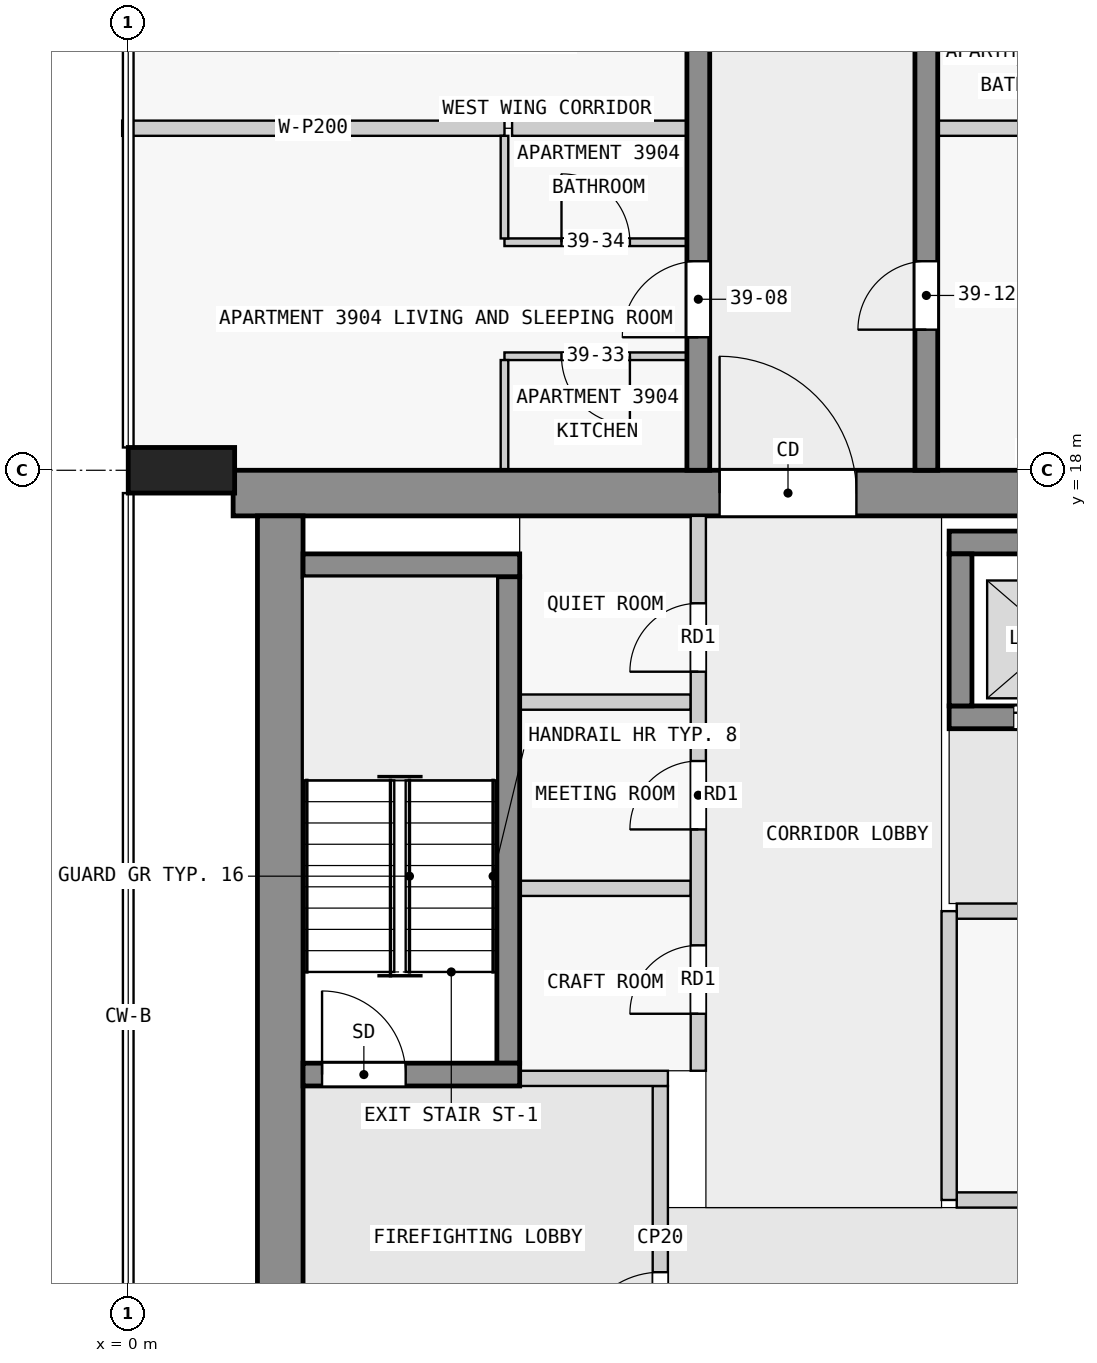
"""IFC4 building model, lengths in metres.
Left out: names, types, materials, properties, quantities, classifications, styles, units other than length and angle.
Written with IfcOpenShell. Run it as: python <this file> out.ifc"""

import sys

from ifc_helpers import new_model, si_unit, direction, frame, frame_2d, origin, origin_2d, place, context, subcontext, project, spatial, rectangle, extrude, element, fill, save


model = new_model("IFC4")
c1 = context("Model", 3, precision=1e-05, world=origin(), true_north=direction((0.0, 1.0)))
c2 = subcontext(c1, "Body", "Model", "MODEL_VIEW")
j1 = project(units=[si_unit("LENGTHUNIT", "METRE"), si_unit("PLANEANGLEUNIT", "RADIAN")], contexts=[c1])
p1 = place(None, origin())
s1 = spatial("IfcSite", under=j1, at=p1, CompositionType="ELEMENT")
p2 = place(p1, origin())
s2 = spatial("IfcBuilding", under=s1, at=p2, CompositionType="ELEMENT")
p3 = place(p2, frame((0.0, 0.0, 153.4)))
s3 = spatial("IfcBuildingStorey", under=s2, at=p3, CompositionType="ELEMENT", Elevation=153.4)
p4 = place(p3, frame((0.7, 18.0, 0.0), z_axis=(0.0, 0.0, 1.0), x_axis=(0.0, 1.0, 0.0)))
e1 = element("IfcColumn", 1, at=p4, inside=s3, PredefinedType="COLUMN", context=c2, shape_type="SweptSolid", body=[
    extrude(rectangle(XDim=0.6, YDim=1.4, at=origin_2d()), origin(), (0.0, 0.0, 1.0), 3.5),
])
p5 = place(p3, frame((1.38, 17.7, 0.0), z_axis=(0.0, 0.0, 1.0), x_axis=(1.0, 0.0, 0.0)))
e2 = element("IfcWall", 2, at=p5, inside=s3, PredefinedType="SHEAR", context=c2, shape_type="SweptSolid", body=[
    extrude(rectangle(XDim=21.12, YDim=0.6, at=frame_2d((10.56, 0.0))), origin(), (0.0, 0.0, 1.0), 3.25),
])
p6 = place(p5, frame((6.4, 0.0, 0.0)))
e3 = element("IfcOpeningElement", 3, at=p6, cuts=e2, PredefinedType="OPENING", context=c2, shape_type="SweptSolid", body=[
    extrude(rectangle(XDim=1.8, YDim=2.1, at=frame_2d((0.9, 1.05))), frame((0.0, 0.31, 0.0), z_axis=(0.0, -1.0, 0.0), x_axis=(1.0, 0.0, 0.0)), (0.0, 0.0, 1.0), 0.62),
])
p7 = place(p3, frame((2.0, 2.5, 0.0), z_axis=(0.0, 0.0, 1.0), x_axis=(0.0, 1.0, 0.0)))
e4 = element("IfcWall", 4, at=p7, inside=s3, PredefinedType="SHEAR", context=c2, shape_type="SweptSolid", body=[
    extrude(rectangle(XDim=14.9, YDim=0.6, at=frame_2d((7.45, 0.0))), origin(), (0.0, 0.0, 1.0), 3.25),
])
p8 = place(p3, frame((2.3, 10.05, 0.0), z_axis=(0.0, 0.0, 1.0), x_axis=(1.0, 0.0, 0.0)))
e5 = element("IfcWall", 5, at=p8, inside=s3, PredefinedType="SHEAR", context=c2, shape_type="SweptSolid", body=[
    extrude(rectangle(XDim=2.85, YDim=0.3, at=frame_2d((1.425, 0.0))), origin(), (0.0, 0.0, 1.0), 3.25),
])
p9 = place(p8, frame((0.25, 0.0, 0.0)))
e6 = element("IfcOpeningElement", 6, at=p9, cuts=e5, PredefinedType="OPENING", context=c2, shape_type="SweptSolid", body=[
    extrude(rectangle(XDim=1.1, YDim=2.1, at=frame_2d((0.55, 1.05))), frame((0.0, 0.16, 0.0), z_axis=(0.0, -1.0, 0.0), x_axis=(1.0, 0.0, 0.0)), (0.0, 0.0, 1.0), 0.32),
])
p10 = place(p3, frame((5.0, 10.2, 0.0), z_axis=(0.0, 0.0, 1.0), x_axis=(0.0, 1.0, 0.0)))
e7 = element("IfcWall", 7, at=p10, inside=s3, PredefinedType="SHEAR", context=c2, shape_type="SweptSolid", body=[
    extrude(rectangle(XDim=6.4, YDim=0.3, at=frame_2d((3.2, 0.0))), origin(), (0.0, 0.0, 1.0), 3.25),
])
p11 = place(p3, frame((2.3, 16.75, 0.0), z_axis=(0.0, 0.0, 1.0), x_axis=(1.0, 0.0, 0.0)))
e8 = element("IfcWall", 8, at=p11, inside=s3, PredefinedType="SHEAR", context=c2, shape_type="SweptSolid", body=[
    extrude(rectangle(XDim=2.85, YDim=0.3, at=frame_2d((1.425, 0.0))), origin(), (0.0, 0.0, 1.0), 3.25),
])
p12 = place(p3, frame((10.8, 17.05, 0.0), z_axis=(0.0, 0.0, 1.0), x_axis=(1.0, 0.0, 0.0)))
e9 = element("IfcWall", 9, at=p12, inside=s3, PredefinedType="SHEAR", context=c2, shape_type="SweptSolid", body=[
    extrude(rectangle(XDim=7.8, YDim=0.3, at=frame_2d((3.9, 0.0))), origin(), (0.0, 0.0, 1.0), 3.25),
])
p13 = place(p3, frame((10.8, 14.75, 0.0), z_axis=(0.0, 0.0, 1.0), x_axis=(1.0, 0.0, 0.0)))
e10 = element("IfcWall", 10, at=p13, inside=s3, PredefinedType="SHEAR", context=c2, shape_type="SweptSolid", body=[
    extrude(rectangle(XDim=7.8, YDim=0.3, at=frame_2d((3.9, 0.0))), origin(), (0.0, 0.0, 1.0), 3.25),
])
p14 = place(p13, frame((0.85, 0.0, 0.0)))
e11 = element("IfcOpeningElement", 11, at=p14, cuts=e10, PredefinedType="OPENING", context=c2, shape_type="SweptSolid", body=[
    extrude(rectangle(XDim=1.1, YDim=2.1, at=frame_2d((0.55, 1.05))), frame((0.0, 0.16, 0.0), z_axis=(0.0, -1.0, 0.0), x_axis=(1.0, 0.0, 0.0)), (0.0, 0.0, 1.0), 0.32),
])
p15 = place(p13, frame((3.35, 0.0, 0.0)))
e12 = element("IfcOpeningElement", 12, at=p15, cuts=e10, PredefinedType="OPENING", context=c2, shape_type="SweptSolid", body=[
    extrude(rectangle(XDim=1.1, YDim=2.1, at=frame_2d((0.55, 1.05))), frame((0.0, 0.16, 0.0), z_axis=(0.0, -1.0, 0.0), x_axis=(1.0, 0.0, 0.0)), (0.0, 0.0, 1.0), 0.32),
])
p16 = place(p13, frame((5.85, 0.0, 0.0)))
e13 = element("IfcOpeningElement", 13, at=p16, cuts=e10, PredefinedType="OPENING", context=c2, shape_type="SweptSolid", body=[
    extrude(rectangle(XDim=1.1, YDim=2.1, at=frame_2d((0.55, 1.05))), frame((0.0, 0.16, 0.0), z_axis=(0.0, -1.0, 0.0), x_axis=(1.0, 0.0, 0.0)), (0.0, 0.0, 1.0), 0.32),
])
p17 = place(p3, frame((10.95, 14.9, 0.0), z_axis=(0.0, 0.0, 1.0), x_axis=(0.0, 1.0, 0.0)))
e14 = element("IfcWall", 14, at=p17, inside=s3, PredefinedType="SHEAR", context=c2, shape_type="SweptSolid", body=[
    extrude(rectangle(XDim=2.0, YDim=0.3, at=frame_2d((1.0, 0.0))), origin(), (0.0, 0.0, 1.0), 3.25),
])
p18 = place(p3, frame((7.5, 18.0, 0.0), z_axis=(0.0, 0.0, 1.0), x_axis=(0.0, 1.0, 0.0)))
e15 = element("IfcWall", 15, at=p18, inside=s3, PredefinedType="SHEAR", context=c2, shape_type="SweptSolid", body=[
    extrude(rectangle(XDim=27.0, YDim=0.3, at=frame_2d((13.5, 0.0))), origin(), (0.0, 0.0, 1.0), 3.25),
])
p19 = place(p18, frame((1.75, 0.0, 0.0)))
e16 = element("IfcOpeningElement", 16, at=p19, cuts=e15, PredefinedType="OPENING", context=c2, shape_type="SweptSolid", body=[
    extrude(rectangle(XDim=1.0, YDim=2.1, at=frame_2d((0.5, 1.05))), frame((0.0, 0.16, 0.0), z_axis=(0.0, -1.0, 0.0), x_axis=(1.0, 0.0, 0.0)), (0.0, 0.0, 1.0), 0.32),
])
p20 = place(p18, frame((5.85, 0.0, 0.0)))
e17 = element("IfcOpeningElement", 17, at=p20, cuts=e15, PredefinedType="OPENING", context=c2, shape_type="SweptSolid", body=[
    extrude(rectangle(XDim=1.8, YDim=2.1, at=frame_2d((0.9, 1.05))), frame((0.0, 0.16, 0.0), z_axis=(0.0, -1.0, 0.0), x_axis=(1.0, 0.0, 0.0)), (0.0, 0.0, 1.0), 0.32),
])
p21 = place(p18, frame((13.05, 0.0, 0.0)))
e18 = element("IfcOpeningElement", 18, at=p21, cuts=e15, PredefinedType="OPENING", context=c2, shape_type="SweptSolid", body=[
    extrude(rectangle(XDim=1.0, YDim=2.1, at=frame_2d((0.5, 1.05))), frame((0.0, 0.16, 0.0), z_axis=(0.0, -1.0, 0.0), x_axis=(1.0, 0.0, 0.0)), (0.0, 0.0, 1.0), 0.32),
])
p22 = place(p18, frame((21.35, 0.0, 0.0)))
e19 = element("IfcOpeningElement", 19, at=p22, cuts=e15, PredefinedType="OPENING", context=c2, shape_type="SweptSolid", body=[
    extrude(rectangle(XDim=1.0, YDim=2.1, at=frame_2d((0.5, 1.05))), frame((0.0, 0.16, 0.0), z_axis=(0.0, -1.0, 0.0), x_axis=(1.0, 0.0, 0.0)), (0.0, 0.0, 1.0), 0.32),
])
p23 = place(p3, frame((10.5, 18.0, 0.0), z_axis=(0.0, 0.0, 1.0), x_axis=(0.0, 1.0, 0.0)))
e20 = element("IfcWall", 20, at=p23, inside=s3, PredefinedType="SHEAR", context=c2, shape_type="SweptSolid", body=[
    extrude(rectangle(XDim=27.0, YDim=0.3, at=frame_2d((13.5, 0.0))), origin(), (0.0, 0.0, 1.0), 3.25),
])
p24 = place(p23, frame((1.85, 0.0, 0.0)))
e21 = element("IfcOpeningElement", 21, at=p24, cuts=e20, PredefinedType="OPENING", context=c2, shape_type="SweptSolid", body=[
    extrude(rectangle(XDim=0.9, YDim=2.1, at=frame_2d((0.45, 1.05))), frame((0.0, 0.16, 0.0), z_axis=(0.0, -1.0, 0.0), x_axis=(1.0, 0.0, 0.0)), (0.0, 0.0, 1.0), 0.32),
])
p25 = place(p23, frame((6.25, 0.0, 0.0)))
e22 = element("IfcOpeningElement", 22, at=p25, cuts=e20, PredefinedType="OPENING", context=c2, shape_type="SweptSolid", body=[
    extrude(rectangle(XDim=1.0, YDim=2.1, at=frame_2d((0.5, 1.05))), frame((0.0, 0.16, 0.0), z_axis=(0.0, -1.0, 0.0), x_axis=(1.0, 0.0, 0.0)), (0.0, 0.0, 1.0), 0.32),
])
p26 = place(p23, frame((10.85, 0.0, 0.0)))
e23 = element("IfcOpeningElement", 23, at=p26, cuts=e20, PredefinedType="OPENING", context=c2, shape_type="SweptSolid", body=[
    extrude(rectangle(XDim=0.9, YDim=2.1, at=frame_2d((0.45, 1.05))), frame((0.0, 0.16, 0.0), z_axis=(0.0, -1.0, 0.0), x_axis=(1.0, 0.0, 0.0)), (0.0, 0.0, 1.0), 0.32),
])
p27 = place(p23, frame((17.55, 0.0, 0.0)))
e24 = element("IfcOpeningElement", 24, at=p27, cuts=e20, PredefinedType="OPENING", context=c2, shape_type="SweptSolid", body=[
    extrude(rectangle(XDim=1.0, YDim=2.1, at=frame_2d((0.5, 1.05))), frame((0.0, 0.16, 0.0), z_axis=(0.0, -1.0, 0.0), x_axis=(1.0, 0.0, 0.0)), (0.0, 0.0, 1.0), 0.32),
])
p28 = place(p23, frame((23.25, 0.0, 0.0)))
e25 = element("IfcOpeningElement", 25, at=p28, cuts=e20, PredefinedType="OPENING", context=c2, shape_type="SweptSolid", body=[
    extrude(rectangle(XDim=0.9, YDim=2.1, at=frame_2d((0.45, 1.05))), frame((0.0, 0.16, 0.0), z_axis=(0.0, -1.0, 0.0), x_axis=(1.0, 0.0, 0.0)), (0.0, 0.0, 1.0), 0.32),
])
p29 = place(p23, frame((25.45, 0.0, 0.0)))
e26 = element("IfcOpeningElement", 26, at=p29, cuts=e20, PredefinedType="OPENING", context=c2, shape_type="SweptSolid", body=[
    extrude(rectangle(XDim=1.0, YDim=2.1, at=frame_2d((0.5, 1.05))), frame((0.0, 0.16, 0.0), z_axis=(0.0, -1.0, 0.0), x_axis=(1.0, 0.0, 0.0)), (0.0, 0.0, 1.0), 0.32),
])
p30 = place(p3, frame((7.0, 5.9, 0.0), z_axis=(0.0, 0.0, 1.0), x_axis=(0.0, 1.0, 0.0)))
e27 = element("IfcWall", 27, at=p30, inside=s3, PredefinedType="PARTITIONING", context=c2, shape_type="SweptSolid", body=[
    extrude(rectangle(XDim=4.0, YDim=0.2, at=frame_2d((2.0, 0.0))), origin(), (0.0, 0.0, 1.0), 3.25),
])
p31 = place(p30, frame((0.45, 0.0, 0.0)))
e28 = element("IfcOpeningElement", 28, at=p31, cuts=e27, PredefinedType="OPENING", context=c2, shape_type="SweptSolid", body=[
    extrude(rectangle(XDim=1.1, YDim=2.1, at=frame_2d((0.55, 1.05))), frame((0.0, 0.11, 0.0), z_axis=(0.0, -1.0, 0.0), x_axis=(1.0, 0.0, 0.0)), (0.0, 0.0, 1.0), 0.22),
])
p32 = place(p3, frame((5.15, 10.0, 0.0), z_axis=(0.0, 0.0, 1.0), x_axis=(1.0, 0.0, 0.0)))
e29 = element("IfcWall", 29, at=p32, inside=s3, PredefinedType="PARTITIONING", context=c2, shape_type="SweptSolid", body=[
    extrude(rectangle(XDim=1.95, YDim=0.2, at=frame_2d((0.975, 0.0))), origin(), (0.0, 0.0, 1.0), 3.25),
])
p33 = place(p3, frame((10.8, 8.4, 0.0), z_axis=(0.0, 0.0, 1.0), x_axis=(0.0, 1.0, 0.0)))
e30 = element("IfcWall", 30, at=p33, inside=s3, PredefinedType="PARTITIONING", context=c2, shape_type="SweptSolid", body=[
    extrude(rectangle(XDim=3.8, YDim=0.2, at=frame_2d((1.9, 0.0))), origin(), (0.0, 0.0, 1.0), 3.25),
])
p34 = place(p3, frame((10.9, 8.4, 0.0), z_axis=(0.0, 0.0, 1.0), x_axis=(1.0, 0.0, 0.0)))
e31 = element("IfcWall", 31, at=p34, inside=s3, PredefinedType="PARTITIONING", context=c2, shape_type="SweptSolid", body=[
    extrude(rectangle(XDim=6.1, YDim=0.2, at=frame_2d((3.05, 0.0))), origin(), (0.0, 0.0, 1.0), 3.25),
])
p35 = place(p3, frame((10.9, 12.2, 0.0), z_axis=(0.0, 0.0, 1.0), x_axis=(1.0, 0.0, 0.0)))
e32 = element("IfcWall", 32, at=p35, inside=s3, PredefinedType="PARTITIONING", context=c2, shape_type="SweptSolid", body=[
    extrude(rectangle(XDim=6.1, YDim=0.2, at=frame_2d((3.05, 0.0))), origin(), (0.0, 0.0, 1.0), 3.25),
])
p36 = place(p35, frame((2.6, 0.0, 0.0)))
e33 = element("IfcOpeningElement", 33, at=p36, cuts=e32, PredefinedType="OPENING", context=c2, shape_type="SweptSolid", body=[
    extrude(rectangle(XDim=0.9, YDim=2.1, at=frame_2d((0.45, 1.05))), frame((0.0, 0.11, 0.0), z_axis=(0.0, -1.0, 0.0), x_axis=(1.0, 0.0, 0.0)), (0.0, 0.0, 1.0), 0.22),
])
p37 = place(p3, frame((7.5, 10.1, 0.0), z_axis=(0.0, 0.0, 1.0), x_axis=(0.0, 1.0, 0.0)))
e34 = element("IfcWall", 34, at=p37, inside=s3, PredefinedType="PARTITIONING", context=c2, shape_type="SweptSolid", body=[
    extrude(rectangle(XDim=7.3, YDim=0.2, at=frame_2d((3.65, 0.0))), origin(), (0.0, 0.0, 1.0), 3.25),
])
p38 = place(p37, frame((0.75, 0.0, 0.0)))
e35 = element("IfcOpeningElement", 35, at=p38, cuts=e34, PredefinedType="OPENING", context=c2, shape_type="SweptSolid", body=[
    extrude(rectangle(XDim=0.9, YDim=2.1, at=frame_2d((0.45, 1.05))), frame((0.0, 0.11, 0.0), z_axis=(0.0, -1.0, 0.0), x_axis=(1.0, 0.0, 0.0)), (0.0, 0.0, 1.0), 0.22),
])
p39 = place(p37, frame((3.175, 0.0, 0.0)))
e36 = element("IfcOpeningElement", 36, at=p39, cuts=e34, PredefinedType="OPENING", context=c2, shape_type="SweptSolid", body=[
    extrude(rectangle(XDim=0.9, YDim=2.1, at=frame_2d((0.45, 1.05))), frame((0.0, 0.11, 0.0), z_axis=(0.0, -1.0, 0.0), x_axis=(1.0, 0.0, 0.0)), (0.0, 0.0, 1.0), 0.22),
])
p40 = place(p37, frame((5.25, 0.0, 0.0)))
e37 = element("IfcOpeningElement", 37, at=p40, cuts=e34, PredefinedType="OPENING", context=c2, shape_type="SweptSolid", body=[
    extrude(rectangle(XDim=0.9, YDim=2.1, at=frame_2d((0.45, 1.05))), frame((0.0, 0.11, 0.0), z_axis=(0.0, -1.0, 0.0), x_axis=(1.0, 0.0, 0.0)), (0.0, 0.0, 1.0), 0.22),
])
for number, where, z_axis, x_axis in (
    (38, (5.15, 12.5, 0.0), (0.0, 0.0, 1.0), (1.0, 0.0, 0.0)),
    (39, (5.15, 14.95, 0.0), (0.0, 0.0, 1.0), (1.0, 0.0, 0.0)),
):
    element("IfcWall", number, at=place(p3, frame(where, z_axis=z_axis, x_axis=x_axis)), inside=s3, PredefinedType="PARTITIONING", context=c2, shape_type="SweptSolid", body=[
        extrude(rectangle(XDim=2.25, YDim=0.2, at=frame_2d((1.125, 0.0))), origin(), (0.0, 0.0, 1.0), 3.25),
    ])
p41 = place(p3, frame((7.35, 19.5, 0.0), z_axis=(0.0, 0.0, 1.0), x_axis=(-1.0, 0.0, 0.0)))
e40 = element("IfcWall", 40, at=p41, inside=s3, PredefinedType="PARTITIONING", context=c2, shape_type="SweptSolid", body=[
    extrude(rectangle(XDim=2.4, YDim=0.1, at=frame_2d((1.2, 0.0))), origin(), (0.0, 0.0, 1.0), 3.25),
])
p42 = place(p41, frame((0.75, 0.0, 0.0)))
e41 = element("IfcOpeningElement", 41, at=p42, cuts=e40, PredefinedType="OPENING", context=c2, shape_type="SweptSolid", body=[
    extrude(rectangle(XDim=0.9, YDim=2.1, at=frame_2d((0.45, 1.05))), frame((0.0, 0.06, 0.0), z_axis=(0.0, -1.0, 0.0), x_axis=(1.0, 0.0, 0.0)), (0.0, 0.0, 1.0), 0.12),
])
p43 = place(p3, frame((4.95, 21.0, 0.0), z_axis=(0.0, 0.0, 1.0), x_axis=(1.0, 0.0, 0.0)))
e42 = element("IfcWall", 42, at=p43, inside=s3, PredefinedType="PARTITIONING", context=c2, shape_type="SweptSolid", body=[
    extrude(rectangle(XDim=2.4, YDim=0.1, at=frame_2d((1.2, 0.0))), origin(), (0.0, 0.0, 1.0), 3.25),
])
p44 = place(p43, frame((0.75, 0.0, 0.0)))
e43 = element("IfcOpeningElement", 43, at=p44, cuts=e42, PredefinedType="OPENING", context=c2, shape_type="SweptSolid", body=[
    extrude(rectangle(XDim=0.9, YDim=2.1, at=frame_2d((0.45, 1.05))), frame((0.0, 0.06, 0.0), z_axis=(0.0, -1.0, 0.0), x_axis=(1.0, 0.0, 0.0)), (0.0, 0.0, 1.0), 0.12),
])
p45 = place(p3, frame((7.35, 22.5, 0.0), z_axis=(0.0, 0.0, 1.0), x_axis=(-1.0, 0.0, 0.0)))
e44 = element("IfcWall", 44, at=p45, inside=s3, PredefinedType="PARTITIONING", context=c2, shape_type="SweptSolid", body=[
    extrude(rectangle(XDim=2.3, YDim=0.2, at=frame_2d((1.15, 0.0))), origin(), (0.0, 0.0, 1.0), 3.25),
])
p46 = place(p3, frame((17.85, 22.5, 0.0), z_axis=(0.0, 0.0, 1.0), x_axis=(-1.0, 0.0, 0.0)))
e45 = element("IfcWall", 45, at=p46, inside=s3, PredefinedType="PARTITIONING", context=c2, shape_type="SweptSolid", body=[
    extrude(rectangle(XDim=7.2, YDim=0.2, at=frame_2d((3.6, 0.0))), origin(), (0.0, 0.0, 1.0), 3.25),
])
p47 = place(p3, frame((-0.08, 22.5, 0.0), z_axis=(0.0, 0.0, 1.0), x_axis=(1.0, 0.0, 0.0)))
e46 = element("IfcWall", 46, at=p47, inside=s3, PredefinedType="PARTITIONING", context=c2, shape_type="SweptSolid", body=[
    extrude(rectangle(XDim=5.03, YDim=0.2, at=frame_2d((2.515, 0.0))), origin(), (0.0, 0.0, 1.0), 3.25),
])
p48 = place(p3, frame((4.95, 19.45, 0.0), z_axis=(0.0, 0.0, 1.0), x_axis=(0.0, -1.0, 0.0)))
e47 = element("IfcWall", 47, at=p48, inside=s3, PredefinedType="PARTITIONING", context=c2, shape_type="SweptSolid", body=[
    extrude(rectangle(XDim=1.45, YDim=0.1, at=frame_2d((0.725, 0.0))), origin(), (0.0, 0.0, 1.0), 3.25),
])
p49 = place(p3, frame((4.95, 22.4, 0.0), z_axis=(0.0, 0.0, 1.0), x_axis=(0.0, -1.0, 0.0)))
e48 = element("IfcWall", 48, at=p49, inside=s3, PredefinedType="PARTITIONING", context=c2, shape_type="SweptSolid", body=[
    extrude(rectangle(XDim=1.35, YDim=0.1, at=frame_2d((0.675, 0.0))), origin(), (0.0, 0.0, 1.0), 3.25),
])
p50 = place(p31, origin())
e49 = element("IfcDoor", 49, at=p50, inside=s3, OperationType="SINGLE_SWING_LEFT", PredefinedType="DOOR", context=c2, shape_type="SweptSolid", body=[
    extrude(rectangle(XDim=1.1, YDim=2.1, at=frame_2d((0.55, 1.05))), frame((0.0, 0.025, 0.0), z_axis=(0.0, -1.0, 0.0), x_axis=(1.0, 0.0, 0.0)), (0.0, 0.0, 1.0), 0.05),
])
fill(e28, e49)
p51 = place(p9, origin())
e50 = element("IfcDoor", 50, at=p51, inside=s3, OperationType="SINGLE_SWING_RIGHT", PredefinedType="DOOR", context=c2, shape_type="SweptSolid", body=[
    extrude(rectangle(XDim=1.1, YDim=2.1, at=frame_2d((0.55, 1.05))), frame((0.0, 0.025, 0.0), z_axis=(0.0, -1.0, 0.0), x_axis=(1.0, 0.0, 0.0)), (0.0, 0.0, 1.0), 0.05),
])
fill(e6, e50)
p52 = place(p14, origin())
e51 = element("IfcDoor", 51, at=p52, inside=s3, OperationType="DOUBLE_DOOR_SLIDING", PredefinedType="DOOR", context=c2, shape_type="SweptSolid", body=[
    extrude(rectangle(XDim=1.1, YDim=2.1, at=frame_2d((0.55, 1.05))), frame((0.0, 0.025, 0.0), z_axis=(0.0, -1.0, 0.0), x_axis=(1.0, 0.0, 0.0)), (0.0, 0.0, 1.0), 0.05),
])
fill(e11, e51)
p53 = place(p6, origin())
e52 = element("IfcDoor", 52, at=p53, inside=s3, OperationType="DOUBLE_DOOR_SINGLE_SWING", PredefinedType="DOOR", context=c2, shape_type="SweptSolid", body=[
    extrude(rectangle(XDim=1.8, YDim=2.1, at=frame_2d((0.9, 1.05))), frame((0.0, 0.025, 0.0), z_axis=(0.0, -1.0, 0.0), x_axis=(1.0, 0.0, 0.0)), (0.0, 0.0, 1.0), 0.05),
])
fill(e3, e52)
p54 = place(p38, origin())
e53 = element("IfcDoor", 53, at=p54, inside=s3, OperationType="SINGLE_SWING_RIGHT", PredefinedType="DOOR", context=c2, shape_type="SweptSolid", body=[
    extrude(rectangle(XDim=0.9, YDim=2.1, at=frame_2d((0.45, 1.05))), frame((0.0, 0.025, 0.0), z_axis=(0.0, -1.0, 0.0), x_axis=(1.0, 0.0, 0.0)), (0.0, 0.0, 1.0), 0.05),
])
fill(e35, e53)
p55 = place(p39, origin())
e54 = element("IfcDoor", 54, at=p55, inside=s3, OperationType="SINGLE_SWING_RIGHT", PredefinedType="DOOR", context=c2, shape_type="SweptSolid", body=[
    extrude(rectangle(XDim=0.9, YDim=2.1, at=frame_2d((0.45, 1.05))), frame((0.0, 0.025, 0.0), z_axis=(0.0, -1.0, 0.0), x_axis=(1.0, 0.0, 0.0)), (0.0, 0.0, 1.0), 0.05),
])
fill(e36, e54)
p56 = place(p40, origin())
e55 = element("IfcDoor", 55, at=p56, inside=s3, OperationType="SINGLE_SWING_RIGHT", PredefinedType="DOOR", context=c2, shape_type="SweptSolid", body=[
    extrude(rectangle(XDim=0.9, YDim=2.1, at=frame_2d((0.45, 1.05))), frame((0.0, 0.025, 0.0), z_axis=(0.0, -1.0, 0.0), x_axis=(1.0, 0.0, 0.0)), (0.0, 0.0, 1.0), 0.05),
])
fill(e37, e55)
p57 = place(p19, origin())
e56 = element("IfcDoor", 56, at=p57, inside=s3, OperationType="SINGLE_SWING_LEFT", PredefinedType="DOOR", context=c2, shape_type="SweptSolid", body=[
    extrude(rectangle(XDim=1.0, YDim=2.1, at=frame_2d((0.5, 1.05))), frame((0.0, 0.025, 0.0), z_axis=(0.0, -1.0, 0.0), x_axis=(1.0, 0.0, 0.0)), (0.0, 0.0, 1.0), 0.05),
])
fill(e16, e56)
p58 = place(p24, origin())
e57 = element("IfcDoor", 57, at=p58, inside=s3, OperationType="SINGLE_SWING_LEFT", PredefinedType="DOOR", context=c2, shape_type="SweptSolid", body=[
    extrude(rectangle(XDim=0.9, YDim=2.1, at=frame_2d((0.45, 1.05))), frame((0.0, 0.025, 0.0), z_axis=(0.0, -1.0, 0.0), x_axis=(1.0, 0.0, 0.0)), (0.0, 0.0, 1.0), 0.05),
])
fill(e21, e57)
p59 = place(p42, origin())
e58 = element("IfcDoor", 58, at=p59, inside=s3, OperationType="SINGLE_SWING_RIGHT", PredefinedType="DOOR", context=c2, shape_type="SweptSolid", body=[
    extrude(rectangle(XDim=0.9, YDim=2.1, at=frame_2d((0.45, 1.05))), frame((0.0, 0.025, 0.0), z_axis=(0.0, -1.0, 0.0), x_axis=(1.0, 0.0, 0.0)), (0.0, 0.0, 1.0), 0.05),
])
fill(e41, e58)
p60 = place(p44, origin())
e59 = element("IfcDoor", 59, at=p60, inside=s3, OperationType="SINGLE_SWING_RIGHT", PredefinedType="DOOR", context=c2, shape_type="SweptSolid", body=[
    extrude(rectangle(XDim=0.9, YDim=2.1, at=frame_2d((0.45, 1.05))), frame((0.0, 0.025, 0.0), z_axis=(0.0, -1.0, 0.0), x_axis=(1.0, 0.0, 0.0)), (0.0, 0.0, 1.0), 0.05),
])
fill(e43, e59)
save(model, sys.argv[1])
